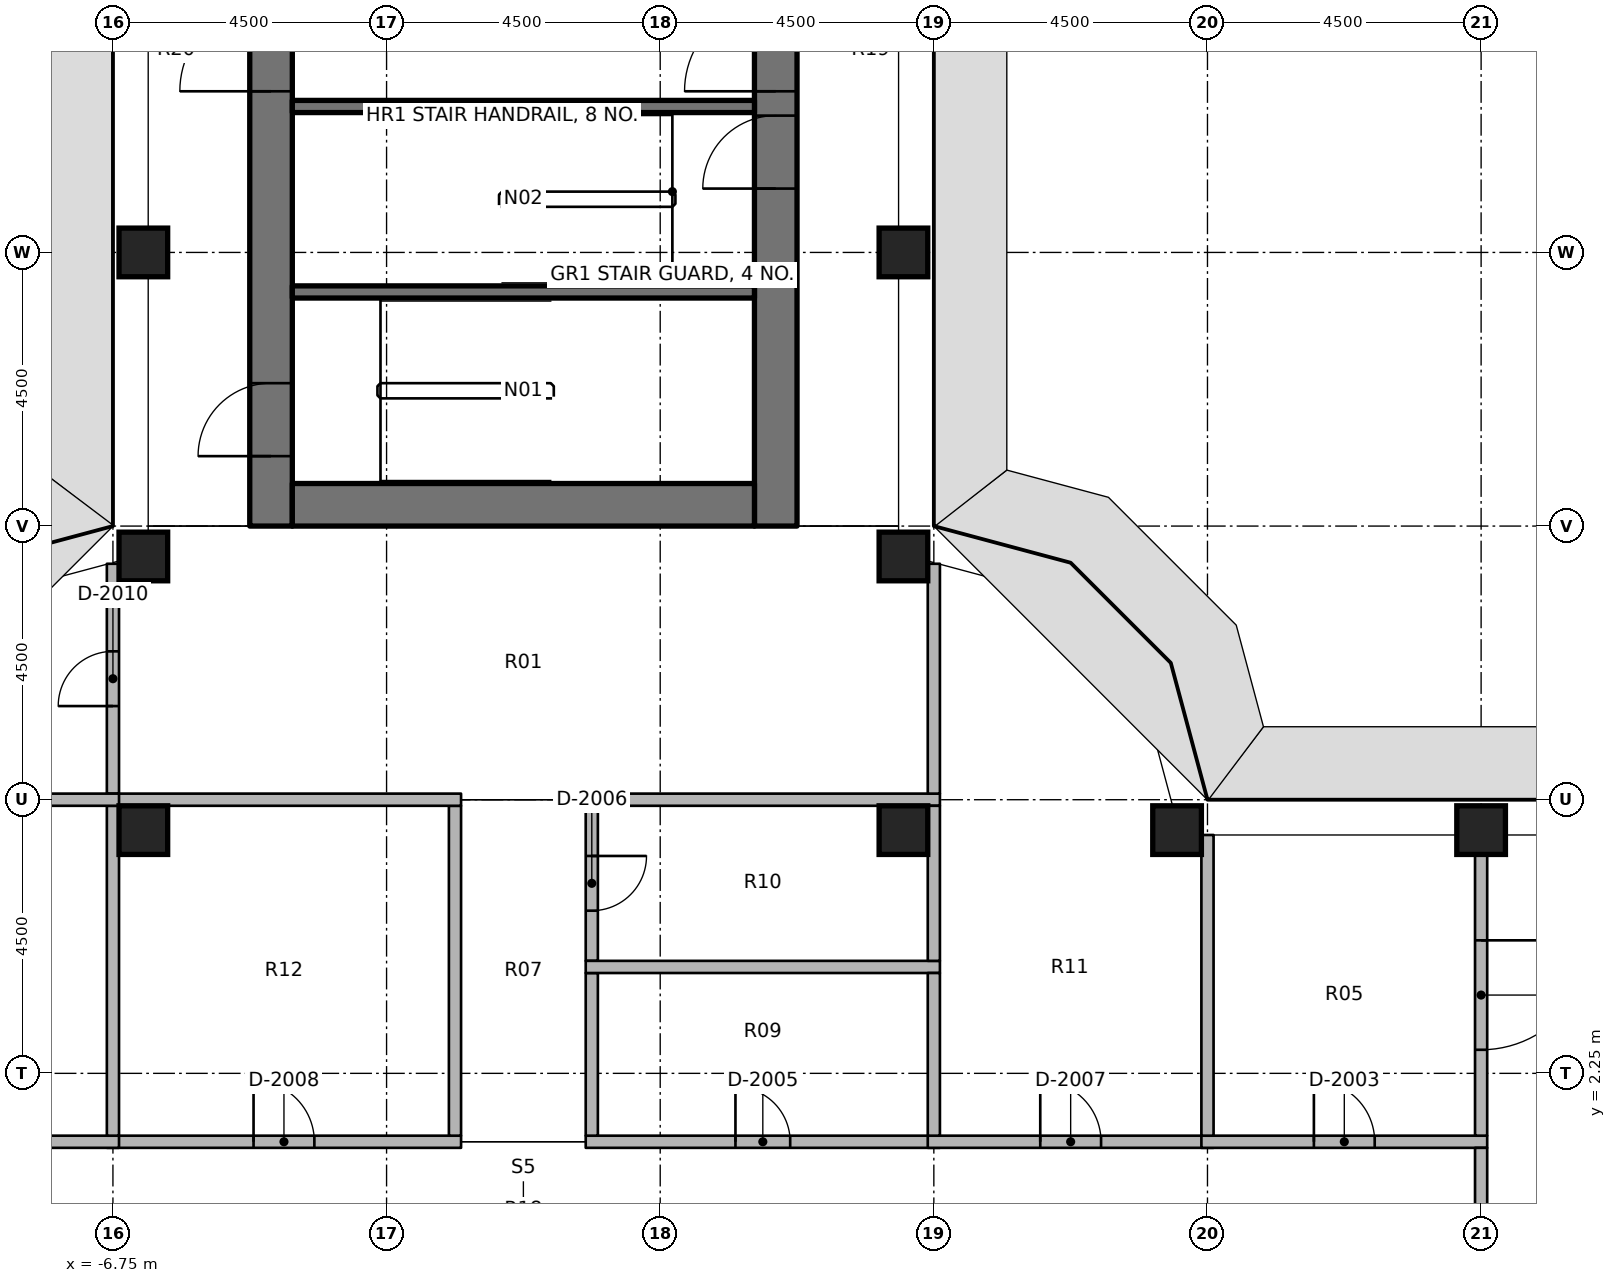
"""IFC4 building model, lengths in metres.
Left out: names, types, materials, properties, quantities, classifications, styles, units other than length and angle.
Written with IfcOpenShell. Run it as: python <this file> out.ifc"""

import sys

from ifc_helpers import new_model, si_unit, direction, frame, frame_2d, origin, origin_2d, place, context, subcontext, project, spatial, rectangle, extrude, element, fill, save


model = new_model("IFC4")
c1 = context("Model", 3, precision=1e-05, world=origin(), true_north=direction((0.0, 1.0)))
c2 = subcontext(c1, "Body", "Model", "MODEL_VIEW")
j1 = project(units=[si_unit("LENGTHUNIT", "METRE"), si_unit("PLANEANGLEUNIT", "RADIAN")], contexts=[c1])
p1 = place(None, origin())
s1 = spatial("IfcSite", under=j1, at=p1, CompositionType="ELEMENT")
p2 = place(p1, origin())
s2 = spatial("IfcBuilding", under=s1, at=p2, CompositionType="ELEMENT")
p3 = place(p2, frame((0.0, 0.0, 186.6)))
s3 = spatial("IfcBuildingStorey", under=s2, at=p3, CompositionType="ELEMENT", Elevation=186.6)
for number, where, z_axis, x_axis in (
    (1, (-6.25, 6.25, 0.0), (0.0, 0.0, 1.0), (1.0, 0.0, 0.0)),
    (2, (-6.25, 10.75, 0.0), (0.0, 0.0, 1.0), (1.0, 0.0, 0.0)),
    (3, (-6.25, 15.75, 0.0), (0.0, 0.0, 1.0), (1.0, 0.0, 0.0)),
    (4, (6.25, 6.25, 0.0), (0.0, 0.0, 1.0), (1.0, 0.0, 0.0)),
    (5, (6.25, 10.75, 0.0), (0.0, 0.0, 1.0), (1.0, 0.0, 0.0)),
    (6, (6.25, 15.75, 0.0), (0.0, 0.0, 1.0), (1.0, 0.0, 0.0)),
    (7, (10.75, 6.25, 0.0), (0.0, 0.0, 1.0), (1.0, 0.0, 0.0)),
    (8, (15.75, 6.25, 0.0), (0.0, 0.0, 1.0), (1.0, 0.0, 0.0)),
):
    element("IfcColumn", number, at=place(p3, frame(where, z_axis=z_axis, x_axis=x_axis)), inside=s3, PredefinedType="COLUMN", context=c2, shape_type="SweptSolid", body=[
        extrude(rectangle(XDim=0.8, YDim=0.8, at=origin_2d()), origin(), (0.0, 0.0, 1.0), 3.65),
    ])
p4 = place(p3, frame((-4.15, 11.25, 0.0), z_axis=(0.0, 0.0, 1.0), x_axis=(0.0, 1.0, 0.0)))
e9 = element("IfcWall", 9, at=p4, inside=s3, PredefinedType="SHEAR", context=c2, shape_type="SweptSolid", body=[
    extrude(rectangle(XDim=15.0, YDim=0.7, at=frame_2d((7.5, 0.0))), origin(), (0.0, 0.0, 1.0), 3.8),
])
p5 = place(p4, frame((7.15, 0.0, 0.0)))
e10 = element("IfcOpeningElement", 10, at=p5, cuts=e9, PredefinedType="OPENING", context=c2, shape_type="SweptSolid", body=[
    extrude(rectangle(XDim=1.5, YDim=2.3, at=frame_2d((0.75, 1.15))), frame((0.0, 0.36, 0.0), z_axis=(0.0, -1.0, 0.0), x_axis=(1.0, 0.0, 0.0)), (0.0, 0.0, 1.0), 0.72),
])
p6 = place(p4, frame((13.9, 0.0, 0.0)))
e11 = element("IfcOpeningElement", 11, at=p6, cuts=e9, PredefinedType="OPENING", context=c2, shape_type="SweptSolid", body=[
    extrude(rectangle(XDim=0.9, YDim=2.1, at=frame_2d((0.45, 1.05))), frame((0.0, 0.36, 0.0), z_axis=(0.0, -1.0, 0.0), x_axis=(1.0, 0.0, 0.0)), (0.0, 0.0, 1.0), 0.72),
])
p7 = place(p4, frame((1.15, 0.0, 0.0)))
e12 = element("IfcOpeningElement", 12, at=p7, cuts=e9, PredefinedType="OPENING", context=c2, shape_type="SweptSolid", body=[
    extrude(rectangle(XDim=1.2, YDim=2.1, at=frame_2d((0.6, 1.05))), frame((0.0, 0.36, 0.0), z_axis=(0.0, -1.0, 0.0), x_axis=(1.0, 0.0, 0.0)), (0.0, 0.0, 1.0), 0.72),
])
p8 = place(p3, frame((4.15, 11.25, 0.0), z_axis=(0.0, 0.0, 1.0), x_axis=(0.0, 1.0, 0.0)))
e13 = element("IfcWall", 13, at=p8, inside=s3, PredefinedType="SHEAR", context=c2, shape_type="SweptSolid", body=[
    extrude(rectangle(XDim=15.0, YDim=0.7, at=frame_2d((7.5, 0.0))), origin(), (0.0, 0.0, 1.0), 3.8),
])
p9 = place(p8, frame((7.15, 0.0, 0.0)))
e14 = element("IfcOpeningElement", 14, at=p9, cuts=e13, PredefinedType="OPENING", context=c2, shape_type="SweptSolid", body=[
    extrude(rectangle(XDim=1.5, YDim=2.3, at=frame_2d((0.75, 1.15))), frame((0.0, 0.36, 0.0), z_axis=(0.0, -1.0, 0.0), x_axis=(1.0, 0.0, 0.0)), (0.0, 0.0, 1.0), 0.72),
])
p10 = place(p8, frame((5.55, 0.0, 0.0)))
e15 = element("IfcOpeningElement", 15, at=p10, cuts=e13, PredefinedType="OPENING", context=c2, shape_type="SweptSolid", body=[
    extrude(rectangle(XDim=1.2, YDim=2.1, at=frame_2d((0.6, 1.05))), frame((0.0, 0.36, 0.0), z_axis=(0.0, -1.0, 0.0), x_axis=(1.0, 0.0, 0.0)), (0.0, 0.0, 1.0), 0.72),
])
p11 = place(p3, frame((-3.8, 11.6, 0.0), z_axis=(0.0, 0.0, 1.0), x_axis=(1.0, 0.0, 0.0)))
e16 = element("IfcWall", 16, at=p11, inside=s3, PredefinedType="SHEAR", context=c2, shape_type="SweptSolid", body=[
    extrude(rectangle(XDim=7.6, YDim=0.7, at=frame_2d((3.8, 0.0))), origin(), (0.0, 0.0, 1.0), 3.8),
])
for number, where, z_axis, x_axis in (
    (17, (-3.8, 18.15, 0.0), (0.0, 0.0, 1.0), (1.0, 0.0, 0.0)),
    (18, (-3.8, 15.1, 0.0), (0.0, 0.0, 1.0), (1.0, 0.0, 0.0)),
):
    element("IfcWall", number, at=place(p3, frame(where, z_axis=z_axis, x_axis=x_axis)), inside=s3, PredefinedType="SHEAR", context=c2, shape_type="SweptSolid", body=[
        extrude(rectangle(XDim=7.6, YDim=0.2, at=frame_2d((3.8, 0.0))), origin(), (0.0, 0.0, 1.0), 3.65),
    ])
p12 = place(p3, frame((1.025, 1.125, 0.0), z_axis=(0.0, 0.0, 1.0), x_axis=(1.0, 0.0, 0.0)))
e19 = element("IfcWall", 19, at=p12, inside=s3, PredefinedType="PARTITIONING", context=c2, shape_type="SweptSolid", body=[
    extrude(rectangle(XDim=5.825, YDim=0.2, at=frame_2d((2.913, 0.0))), origin(), (0.0, 0.0, 1.0), 2.746),
])
p13 = place(p12, frame((2.462, 0.0, 0.0)))
e20 = element("IfcOpeningElement", 20, at=p13, cuts=e19, PredefinedType="OPENING", context=c2, shape_type="SweptSolid", body=[
    extrude(rectangle(XDim=0.9, YDim=2.1, at=frame_2d((0.45, 1.05))), frame((0.0, 0.11, 0.0), z_axis=(0.0, -1.0, 0.0), x_axis=(1.0, 0.0, 0.0)), (0.0, 0.0, 1.0), 0.22),
])
p14 = place(p3, frame((6.65, 1.125, 0.0), z_axis=(0.0, 0.0, 1.0), x_axis=(1.0, 0.0, 0.0)))
e21 = element("IfcWall", 21, at=p14, inside=s3, PredefinedType="PARTITIONING", context=c2, shape_type="SweptSolid", body=[
    extrude(rectangle(XDim=4.7, YDim=0.2, at=frame_2d((2.35, 0.0))), origin(), (0.0, 0.0, 1.0), 2.746),
])
p15 = place(p14, frame((1.85, 0.0, 0.0)))
e22 = element("IfcOpeningElement", 22, at=p15, cuts=e21, PredefinedType="OPENING", context=c2, shape_type="SweptSolid", body=[
    extrude(rectangle(XDim=1.0, YDim=2.1, at=frame_2d((0.5, 1.05))), frame((0.0, 0.11, 0.0), z_axis=(0.0, -1.0, 0.0), x_axis=(1.0, 0.0, 0.0)), (0.0, 0.0, 1.0), 0.22),
])
p16 = place(p3, frame((-6.85, 1.125, 0.0), z_axis=(0.0, 0.0, 1.0), x_axis=(1.0, 0.0, 0.0)))
e23 = element("IfcWall", 23, at=p16, inside=s3, PredefinedType="PARTITIONING", context=c2, shape_type="SweptSolid", body=[
    extrude(rectangle(XDim=5.825, YDim=0.2, at=frame_2d((2.913, 0.0))), origin(), (0.0, 0.0, 1.0), 2.746),
])
p17 = place(p16, frame((2.413, 0.0, 0.0)))
e24 = element("IfcOpeningElement", 24, at=p17, cuts=e23, PredefinedType="OPENING", context=c2, shape_type="SweptSolid", body=[
    extrude(rectangle(XDim=1.0, YDim=2.1, at=frame_2d((0.5, 1.05))), frame((0.0, 0.11, 0.0), z_axis=(0.0, -1.0, 0.0), x_axis=(1.0, 0.0, 0.0)), (0.0, 0.0, 1.0), 0.22),
])
p18 = place(p3, frame((-11.35, 1.125, 0.0), z_axis=(0.0, 0.0, 1.0), x_axis=(1.0, 0.0, 0.0)))
e25 = element("IfcWall", 25, at=p18, inside=s3, PredefinedType="PARTITIONING", context=c2, shape_type="SweptSolid", body=[
    extrude(rectangle(XDim=4.7, YDim=0.2, at=frame_2d((2.35, 0.0))), origin(), (0.0, 0.0, 1.0), 2.746),
])
p19 = place(p18, frame((1.85, 0.0, 0.0)))
e26 = element("IfcOpeningElement", 26, at=p19, cuts=e25, PredefinedType="OPENING", context=c2, shape_type="SweptSolid", body=[
    extrude(rectangle(XDim=1.0, YDim=2.1, at=frame_2d((0.5, 1.05))), frame((0.0, 0.11, 0.0), z_axis=(0.0, -1.0, 0.0), x_axis=(1.0, 0.0, 0.0)), (0.0, 0.0, 1.0), 0.22),
])
p20 = place(p3, frame((11.15, 1.125, 0.0), z_axis=(0.0, 0.0, 1.0), x_axis=(1.0, 0.0, 0.0)))
e27 = element("IfcWall", 27, at=p20, inside=s3, PredefinedType="PARTITIONING", context=c2, shape_type="SweptSolid", body=[
    extrude(rectangle(XDim=4.7, YDim=0.2, at=frame_2d((2.35, 0.0))), origin(), (0.0, 0.0, 1.0), 2.746),
])
p21 = place(p20, frame((1.85, 0.0, 0.0)))
e28 = element("IfcOpeningElement", 28, at=p21, cuts=e27, PredefinedType="OPENING", context=c2, shape_type="SweptSolid", body=[
    extrude(rectangle(XDim=1.0, YDim=2.1, at=frame_2d((0.5, 1.05))), frame((0.0, 0.11, 0.0), z_axis=(0.0, -1.0, 0.0), x_axis=(1.0, 0.0, 0.0)), (0.0, 0.0, 1.0), 0.22),
])
p22 = place(p3, frame((15.75, -1.025, 0.0), z_axis=(0.0, 0.0, 1.0), x_axis=(0.0, 1.0, 0.0)))
e29 = element("IfcWall", 29, at=p22, inside=s3, PredefinedType="PARTITIONING", context=c2, shape_type="SweptSolid", body=[
    extrude(rectangle(XDim=2.05, YDim=0.2, at=frame_2d((1.025, 0.0))), origin(), (0.0, 0.0, 1.0), 2.746),
])
p23 = place(p3, frame((1.125, 1.225, 0.0), z_axis=(0.0, 0.0, 1.0), x_axis=(0.0, 1.0, 0.0)))
e30 = element("IfcWall", 30, at=p23, inside=s3, PredefinedType="PARTITIONING", context=c2, shape_type="SweptSolid", body=[
    extrude(rectangle(XDim=2.675, YDim=0.2, at=frame_2d((1.337, 0.0))), origin(), (0.0, 0.0, 1.0), 2.746),
])
p24 = place(p3, frame((1.125, 6.65, 0.0), z_axis=(0.0, 0.0, 1.0), x_axis=(0.0, -1.0, 0.0)))
e31 = element("IfcWall", 31, at=p24, inside=s3, PredefinedType="PARTITIONING", context=c2, shape_type="SweptSolid", body=[
    extrude(rectangle(XDim=2.55, YDim=0.2, at=frame_2d((1.275, 0.0))), origin(), (0.0, 0.0, 1.0), 2.746),
])
p25 = place(p24, frame((0.825, 0.0, 0.0)))
e32 = element("IfcOpeningElement", 32, at=p25, cuts=e31, PredefinedType="OPENING", context=c2, shape_type="SweptSolid", body=[
    extrude(rectangle(XDim=0.9, YDim=2.1, at=frame_2d((0.45, 1.05))), frame((0.0, 0.11, 0.0), z_axis=(0.0, -1.0, 0.0), x_axis=(1.0, 0.0, 0.0)), (0.0, 0.0, 1.0), 0.22),
])
p26 = place(p3, frame((-1.125, 1.225, 0.0), z_axis=(0.0, 0.0, 1.0), x_axis=(0.0, 1.0, 0.0)))
e33 = element("IfcWall", 33, at=p26, inside=s3, PredefinedType="PARTITIONING", context=c2, shape_type="SweptSolid", body=[
    extrude(rectangle(XDim=5.425, YDim=0.2, at=frame_2d((2.712, 0.0))), origin(), (0.0, 0.0, 1.0), 2.746),
])
p27 = place(p3, frame((1.025, 6.75, 0.0), z_axis=(0.0, 0.0, 1.0), x_axis=(1.0, 0.0, 0.0)))
e34 = element("IfcWall", 34, at=p27, inside=s3, PredefinedType="PARTITIONING", context=c2, shape_type="SweptSolid", body=[
    extrude(rectangle(XDim=5.825, YDim=0.2, at=frame_2d((2.913, 0.0))), origin(), (0.0, 0.0, 1.0), 2.746),
])
p28 = place(p3, frame((6.75, 6.85, 0.0), z_axis=(0.0, 0.0, 1.0), x_axis=(0.0, 1.0, 0.0)))
e35 = element("IfcWall", 35, at=p28, inside=s3, PredefinedType="PARTITIONING", context=c2, shape_type="SweptSolid", body=[
    extrude(rectangle(XDim=3.78, YDim=0.2, at=frame_2d((1.89, 0.0))), origin(), (0.0, 0.0, 1.0), 2.746),
])
p29 = place(p3, frame((-6.85, 6.75, 0.0), z_axis=(0.0, 0.0, 1.0), x_axis=(1.0, 0.0, 0.0)))
e36 = element("IfcWall", 36, at=p29, inside=s3, PredefinedType="PARTITIONING", context=c2, shape_type="SweptSolid", body=[
    extrude(rectangle(XDim=5.825, YDim=0.2, at=frame_2d((2.913, 0.0))), origin(), (0.0, 0.0, 1.0), 2.746),
])
p30 = place(p3, frame((-6.75, 6.85, 0.0), z_axis=(0.0, 0.0, 1.0), x_axis=(0.0, 1.0, 0.0)))
e37 = element("IfcWall", 37, at=p30, inside=s3, PredefinedType="PARTITIONING", context=c2, shape_type="SweptSolid", body=[
    extrude(rectangle(XDim=3.78, YDim=0.2, at=frame_2d((1.89, 0.0))), origin(), (0.0, 0.0, 1.0), 2.746),
])
p31 = place(p30, frame((1.44, 0.0, 0.0)))
e38 = element("IfcOpeningElement", 38, at=p31, cuts=e37, PredefinedType="OPENING", context=c2, shape_type="SweptSolid", body=[
    extrude(rectangle(XDim=0.9, YDim=2.1, at=frame_2d((0.45, 1.05))), frame((0.0, 0.11, 0.0), z_axis=(0.0, -1.0, 0.0), x_axis=(1.0, 0.0, 0.0)), (0.0, 0.0, 1.0), 0.22),
])
p32 = place(p3, frame((1.025, 4.0, 0.0), z_axis=(0.0, 0.0, 1.0), x_axis=(1.0, 0.0, 0.0)))
e39 = element("IfcWall", 39, at=p32, inside=s3, PredefinedType="PARTITIONING", context=c2, shape_type="SweptSolid", body=[
    extrude(rectangle(XDim=5.825, YDim=0.2, at=frame_2d((2.913, 0.0))), origin(), (0.0, 0.0, 1.0), 2.746),
])
p33 = place(p3, frame((6.75, 1.225, 0.0), z_axis=(0.0, 0.0, 1.0), x_axis=(0.0, 1.0, 0.0)))
e40 = element("IfcWall", 40, at=p33, inside=s3, PredefinedType="PARTITIONING", context=c2, shape_type="SweptSolid", body=[
    extrude(rectangle(XDim=2.675, YDim=0.2, at=frame_2d((1.337, 0.0))), origin(), (0.0, 0.0, 1.0), 2.746),
])
p34 = place(p3, frame((6.75, 4.1, 0.0), z_axis=(0.0, 0.0, 1.0), x_axis=(0.0, 1.0, 0.0)))
e41 = element("IfcWall", 41, at=p34, inside=s3, PredefinedType="PARTITIONING", context=c2, shape_type="SweptSolid", body=[
    extrude(rectangle(XDim=2.55, YDim=0.2, at=frame_2d((1.275, 0.0))), origin(), (0.0, 0.0, 1.0), 2.746),
])
p35 = place(p3, frame((11.25, 1.225, 0.0), z_axis=(0.0, 0.0, 1.0), x_axis=(0.0, 1.0, 0.0)))
e42 = element("IfcWall", 42, at=p35, inside=s3, PredefinedType="PARTITIONING", context=c2, shape_type="SweptSolid", body=[
    extrude(rectangle(XDim=4.945, YDim=0.2, at=frame_2d((2.472, 0.0))), origin(), (0.0, 0.0, 1.0), 2.746),
])
p36 = place(p3, frame((-6.75, 1.225, 0.0), z_axis=(0.0, 0.0, 1.0), x_axis=(0.0, 1.0, 0.0)))
e43 = element("IfcWall", 43, at=p36, inside=s3, PredefinedType="PARTITIONING", context=c2, shape_type="SweptSolid", body=[
    extrude(rectangle(XDim=5.425, YDim=0.2, at=frame_2d((2.712, 0.0))), origin(), (0.0, 0.0, 1.0), 2.746),
])
p37 = place(p3, frame((-11.35, 6.75, 0.0), z_axis=(0.0, 0.0, 1.0), x_axis=(1.0, 0.0, 0.0)))
e44 = element("IfcWall", 44, at=p37, inside=s3, PredefinedType="PARTITIONING", context=c2, shape_type="SweptSolid", body=[
    extrude(rectangle(XDim=4.7, YDim=0.2, at=frame_2d((2.35, 0.0))), origin(), (0.0, 0.0, 1.0), 2.746),
])
p38 = place(p3, frame((15.75, 5.85, 0.0), z_axis=(0.0, 0.0, 1.0), x_axis=(0.0, -1.0, 0.0)))
e45 = element("IfcWall", 45, at=p38, inside=s3, PredefinedType="PARTITIONING", context=c2, shape_type="SweptSolid", body=[
    extrude(rectangle(XDim=4.625, YDim=0.2, at=frame_2d((2.312, 0.0))), origin(), (0.0, 0.0, 1.0), 2.746),
])
p39 = place(p38, frame((1.413, 0.0, 0.0)))
e46 = element("IfcOpeningElement", 46, at=p39, cuts=e45, PredefinedType="OPENING", context=c2, shape_type="SweptSolid", body=[
    extrude(rectangle(XDim=1.8, YDim=2.1, at=frame_2d((0.9, 1.05))), frame((0.0, 0.11, 0.0), z_axis=(0.0, -1.0, 0.0), x_axis=(1.0, 0.0, 0.0)), (0.0, 0.0, 1.0), 0.22),
])
p40 = place(p5, origin())
e47 = element("IfcDoor", 47, at=p40, inside=s3, OperationType="DOUBLE_DOOR_SINGLE_SWING", PredefinedType="DOOR", context=c2, shape_type="SweptSolid", body=[
    extrude(rectangle(XDim=1.5, YDim=2.3, at=frame_2d((0.75, 1.15))), frame((0.0, 0.025, 0.0), z_axis=(0.0, -1.0, 0.0), x_axis=(1.0, 0.0, 0.0)), (0.0, 0.0, 1.0), 0.05),
])
fill(e10, e47)
p41 = place(p9, origin())
e48 = element("IfcDoor", 48, at=p41, inside=s3, OperationType="DOUBLE_DOOR_SINGLE_SWING", PredefinedType="DOOR", context=c2, shape_type="SweptSolid", body=[
    extrude(rectangle(XDim=1.5, YDim=2.3, at=frame_2d((0.75, 1.15))), frame((0.0, 0.025, 0.0), z_axis=(0.0, -1.0, 0.0), x_axis=(1.0, 0.0, 0.0)), (0.0, 0.0, 1.0), 0.05),
])
fill(e14, e48)
p42 = place(p10, origin())
e49 = element("IfcDoor", 49, at=p42, inside=s3, OperationType="SINGLE_SWING_LEFT", PredefinedType="DOOR", context=c2, shape_type="SweptSolid", body=[
    extrude(rectangle(XDim=1.2, YDim=2.1, at=frame_2d((0.6, 1.05))), frame((0.0, 0.025, 0.0), z_axis=(0.0, -1.0, 0.0), x_axis=(1.0, 0.0, 0.0)), (0.0, 0.0, 1.0), 0.05),
])
fill(e15, e49)
p43 = place(p7, origin())
e50 = element("IfcDoor", 50, at=p43, inside=s3, OperationType="SINGLE_SWING_RIGHT", PredefinedType="DOOR", context=c2, shape_type="SweptSolid", body=[
    extrude(rectangle(XDim=1.2, YDim=2.1, at=frame_2d((0.6, 1.05))), frame((0.0, 0.025, 0.0), z_axis=(0.0, -1.0, 0.0), x_axis=(1.0, 0.0, 0.0)), (0.0, 0.0, 1.0), 0.05),
])
fill(e12, e50)
p44 = place(p39, origin())
e51 = element("IfcDoor", 51, at=p44, inside=s3, OperationType="DOUBLE_DOOR_SINGLE_SWING", PredefinedType="DOOR", context=c2, shape_type="SweptSolid", body=[
    extrude(rectangle(XDim=1.8, YDim=2.1, at=frame_2d((0.9, 1.05))), frame((0.0, 0.025, 0.0), z_axis=(0.0, -1.0, 0.0), x_axis=(1.0, 0.0, 0.0)), (0.0, 0.0, 1.0), 0.05),
])
fill(e46, e51)
p45 = place(p21, origin())
e52 = element("IfcDoor", 52, at=p45, inside=s3, OperationType="SINGLE_SWING_RIGHT", PredefinedType="DOOR", context=c2, shape_type="SweptSolid", body=[
    extrude(rectangle(XDim=1.0, YDim=2.1, at=frame_2d((0.5, 1.05))), frame((0.0, 0.025, 0.0), z_axis=(0.0, -1.0, 0.0), x_axis=(1.0, 0.0, 0.0)), (0.0, 0.0, 1.0), 0.05),
])
fill(e28, e52)
p46 = place(p13, origin())
e53 = element("IfcDoor", 53, at=p46, inside=s3, OperationType="SINGLE_SWING_RIGHT", PredefinedType="DOOR", context=c2, shape_type="SweptSolid", body=[
    extrude(rectangle(XDim=0.9, YDim=2.1, at=frame_2d((0.45, 1.05))), frame((0.0, 0.025, 0.0), z_axis=(0.0, -1.0, 0.0), x_axis=(1.0, 0.0, 0.0)), (0.0, 0.0, 1.0), 0.05),
])
fill(e20, e53)
p47 = place(p25, origin())
e54 = element("IfcDoor", 54, at=p47, inside=s3, OperationType="SINGLE_SWING_RIGHT", PredefinedType="DOOR", context=c2, shape_type="SweptSolid", body=[
    extrude(rectangle(XDim=0.9, YDim=2.1, at=frame_2d((0.45, 1.05))), frame((0.0, 0.025, 0.0), z_axis=(0.0, -1.0, 0.0), x_axis=(1.0, 0.0, 0.0)), (0.0, 0.0, 1.0), 0.05),
])
fill(e32, e54)
p48 = place(p15, origin())
e55 = element("IfcDoor", 55, at=p48, inside=s3, OperationType="SINGLE_SWING_RIGHT", PredefinedType="DOOR", context=c2, shape_type="SweptSolid", body=[
    extrude(rectangle(XDim=1.0, YDim=2.1, at=frame_2d((0.5, 1.05))), frame((0.0, 0.025, 0.0), z_axis=(0.0, -1.0, 0.0), x_axis=(1.0, 0.0, 0.0)), (0.0, 0.0, 1.0), 0.05),
])
fill(e22, e55)
p49 = place(p17, origin())
e56 = element("IfcDoor", 56, at=p49, inside=s3, OperationType="SINGLE_SWING_RIGHT", PredefinedType="DOOR", context=c2, shape_type="SweptSolid", body=[
    extrude(rectangle(XDim=1.0, YDim=2.1, at=frame_2d((0.5, 1.05))), frame((0.0, 0.025, 0.0), z_axis=(0.0, -1.0, 0.0), x_axis=(1.0, 0.0, 0.0)), (0.0, 0.0, 1.0), 0.05),
])
fill(e24, e56)
p50 = place(p31, origin())
e57 = element("IfcDoor", 57, at=p50, inside=s3, OperationType="SINGLE_SWING_LEFT", PredefinedType="DOOR", context=c2, shape_type="SweptSolid", body=[
    extrude(rectangle(XDim=0.9, YDim=2.1, at=frame_2d((0.45, 1.05))), frame((0.0, 0.025, 0.0), z_axis=(0.0, -1.0, 0.0), x_axis=(1.0, 0.0, 0.0)), (0.0, 0.0, 1.0), 0.05),
])
fill(e38, e57)
save(model, sys.argv[1])
